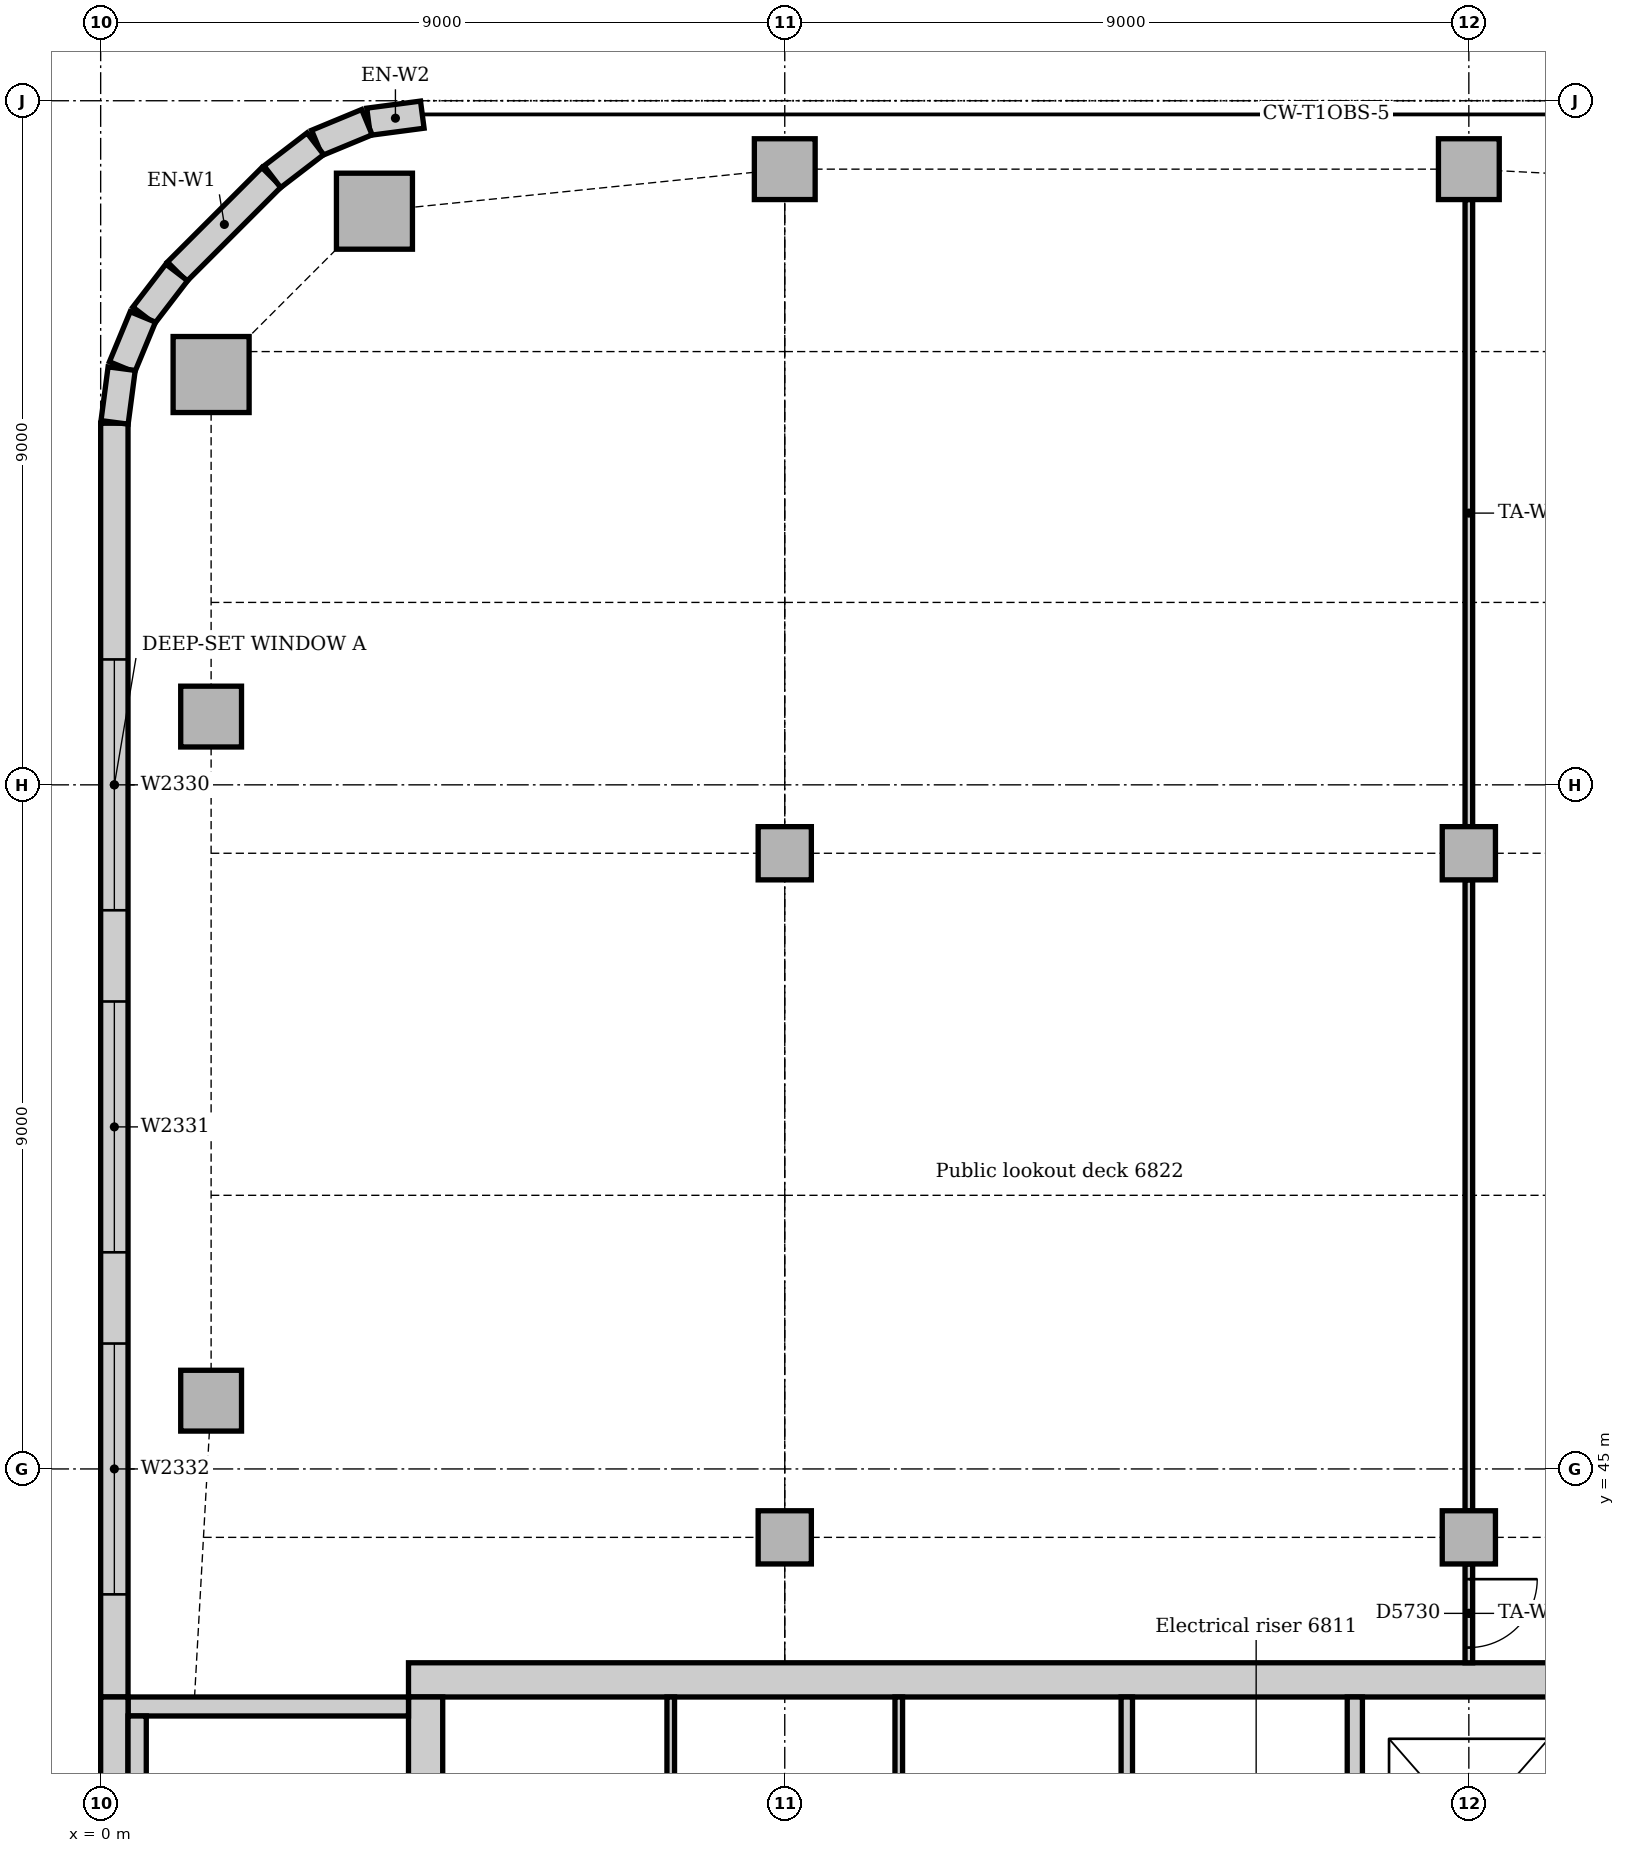
"""IFC4 building model, lengths in metres.
Left out: names, types, materials, properties, quantities, classifications, styles, units other than length and angle.
Written with IfcOpenShell. Run it as: python <this file> out.ifc"""

import sys

from ifc_helpers import new_model, si_unit, direction, frame, frame_2d, origin, origin_2d, place, context, subcontext, project, spatial, rectangle, extrude, element, fill, save


model = new_model("IFC4")
c1 = context("Model", 3, precision=1e-05, world=origin(), true_north=direction((0.0, 1.0)))
c2 = subcontext(c1, "Body", "Model", "MODEL_VIEW")
j1 = project(units=[si_unit("LENGTHUNIT", "METRE"), si_unit("PLANEANGLEUNIT", "RADIAN")], contexts=[c1])
p1 = place(None, origin())
s1 = spatial("IfcSite", under=j1, at=p1, CompositionType="ELEMENT")
p2 = place(p1, origin())
s2 = spatial("IfcBuilding", under=s1, at=p2, CompositionType="ELEMENT")
p3 = place(p2, frame((0.0, 0.0, 283.0)))
s3 = spatial("IfcBuildingStorey", under=s2, at=p3, CompositionType="ELEMENT", Elevation=283.0)
p4 = place(p3, frame((22.95, 42.225, 0.0), z_axis=(0.0, 0.0, 1.0), x_axis=(-1.0, 0.0, 0.0)))
e1 = element("IfcWall", 1, at=p4, inside=s3, PredefinedType="SOLIDWALL", context=c2, shape_type="SweptSolid", body=[
    extrude(rectangle(XDim=18.9, YDim=0.45, at=frame_2d((9.45, 0.0))), origin(), (0.0, 0.0, 1.0), 8.0),
])
p5 = place(p3, frame((4.275, 42.0, 0.0), z_axis=(0.0, 0.0, 1.0), x_axis=(0.0, -1.0, 0.0)))
e2 = element("IfcWall", 2, at=p5, inside=s3, PredefinedType="SOLIDWALL", context=c2, shape_type="SweptSolid", body=[
    extrude(rectangle(XDim=10.5, YDim=0.45, at=frame_2d((5.25, 0.0))), origin(), (0.0, 0.0, 1.0), 8.0),
])
p6 = place(p5, frame((5.3, 0.0, 0.0)))
e3 = element("IfcOpeningElement", 3, at=p6, cuts=e2, PredefinedType="OPENING", context=c2, shape_type="SweptSolid", body=[
    extrude(rectangle(XDim=1.0, YDim=2.1, at=frame_2d((0.5, 1.05))), frame((0.0, 0.235, 0.0), z_axis=(0.0, -1.0, 0.0), x_axis=(1.0, 0.0, 0.0)), (0.0, 0.0, 1.0), 0.47),
])
p7 = place(p3, frame((4.05, 41.875, 0.0), z_axis=(0.0, 0.0, 1.0), x_axis=(-1.0, 0.0, 0.0)))
e4 = element("IfcWall", 4, at=p7, inside=s3, PredefinedType="SOLIDWALL", context=c2, shape_type="SweptSolid", body=[
    extrude(rectangle(XDim=3.69, YDim=0.25, at=frame_2d((1.845, 0.0))), origin(), (0.0, 0.0, 1.0), 8.0),
])
for number, where, z_axis, x_axis in (
    (5, (3.602, 61.547, 0.0), (0.0, 0.0, 1.0), (1.0, 0.0, 0.0)),
    (6, (1.453, 59.398, 0.0), (0.0, 0.0, 1.0), (1.0, 0.0, 0.0)),
):
    element("IfcColumn", number, at=place(p3, frame(where, z_axis=z_axis, x_axis=x_axis)), inside=s3, PredefinedType="COLUMN", context=c2, shape_type="SweptSolid", body=[
        extrude(rectangle(XDim=1.0, YDim=1.0, at=origin_2d()), origin(), (0.0, 0.0, 1.0), 7.7),
    ])
for number, where, z_axis, x_axis in (
    (7, (9.0, 62.1, 0.0), (0.0, 0.0, 1.0), (1.0, 0.0, 0.0)),
    (8, (18.0, 62.1, 0.0), (0.0, 0.0, 1.0), (1.0, 0.0, 0.0)),
    (9, (1.453, 45.898, 0.0), (0.0, 0.0, 1.0), (1.0, 0.0, 0.0)),
    (10, (1.453, 54.898, 0.0), (0.0, 0.0, 1.0), (1.0, 0.0, 0.0)),
):
    element("IfcColumn", number, at=place(p3, frame(where, z_axis=z_axis, x_axis=x_axis)), inside=s3, PredefinedType="COLUMN", context=c2, shape_type="SweptSolid", body=[
        extrude(rectangle(XDim=0.8, YDim=0.8, at=origin_2d()), origin(), (0.0, 0.0, 1.0), 7.7),
    ])
for number, where, z_axis, x_axis in (
    (11, (9.0, 44.1, 0.0), (0.0, 0.0, 1.0), (1.0, 0.0, 0.0)),
    (12, (9.0, 53.1, 0.0), (0.0, 0.0, 1.0), (1.0, 0.0, 0.0)),
    (13, (18.0, 44.1, 0.0), (0.0, 0.0, 1.0), (1.0, 0.0, 0.0)),
    (14, (18.0, 53.1, 0.0), (0.0, 0.0, 1.0), (1.0, 0.0, 0.0)),
):
    element("IfcColumn", number, at=place(p3, frame(where, z_axis=z_axis, x_axis=x_axis)), inside=s3, PredefinedType="COLUMN", context=c2, shape_type="SweptSolid", body=[
        extrude(rectangle(XDim=0.7, YDim=0.7, at=origin_2d()), origin(), (0.0, 0.0, 1.0), 7.7),
    ])
p8 = place(p3, frame((2.249, 61.994, 0.0), z_axis=(0.0, 0.0, 1.0), x_axis=(-0.707106781187, -0.707106781187, 0.0)))
e15 = element("IfcWall", 15, at=p8, inside=s3, PredefinedType="STANDARD", context=c2, shape_type="SweptSolid", body=[
    extrude(rectangle(XDim=1.757, YDim=0.36, at=frame_2d((0.879, 0.0))), origin(), (0.0, 0.0, 1.0), 7.7),
])
p9 = place(p3, frame((0.18, 58.757, 0.0), z_axis=(0.0, 0.0, 1.0), x_axis=(0.0, -1.0, 0.0)))
e16 = element("IfcWall", 16, at=p9, inside=s3, PredefinedType="STANDARD", context=c2, shape_type="SweptSolid", body=[
    extrude(rectangle(XDim=16.757, YDim=0.36, at=frame_2d((8.379, 0.0))), origin(), (0.0, 0.0, 1.0), 7.7),
])
p10 = place(p9, frame((3.107, 0.0, 0.9)))
e17 = element("IfcOpeningElement", 17, at=p10, cuts=e16, PredefinedType="OPENING", context=c2, shape_type="SweptSolid", body=[
    extrude(rectangle(XDim=3.3, YDim=1.6, at=frame_2d((1.65, 0.8))), frame((0.0, 0.19, 0.0), z_axis=(0.0, -1.0, 0.0), x_axis=(1.0, 0.0, 0.0)), (0.0, 0.0, 1.0), 0.38),
])
p11 = place(p9, frame((7.607, 0.0, 0.9)))
e18 = element("IfcOpeningElement", 18, at=p11, cuts=e16, PredefinedType="OPENING", context=c2, shape_type="SweptSolid", body=[
    extrude(rectangle(XDim=3.3, YDim=1.6, at=frame_2d((1.65, 0.8))), frame((0.0, 0.19, 0.0), z_axis=(0.0, -1.0, 0.0), x_axis=(1.0, 0.0, 0.0)), (0.0, 0.0, 1.0), 0.38),
])
p12 = place(p9, frame((12.107, 0.0, 0.9)))
e19 = element("IfcOpeningElement", 19, at=p12, cuts=e16, PredefinedType="OPENING", context=c2, shape_type="SweptSolid", body=[
    extrude(rectangle(XDim=3.3, YDim=1.6, at=frame_2d((1.65, 0.8))), frame((0.0, 0.19, 0.0), z_axis=(0.0, -1.0, 0.0), x_axis=(1.0, 0.0, 0.0)), (0.0, 0.0, 1.0), 0.38),
])
p13 = place(p3, frame((0.18, 42.0, 0.0), z_axis=(0.0, 0.0, 1.0), x_axis=(0.0, -1.0, 0.0)))
e20 = element("IfcWall", 20, at=p13, inside=s3, PredefinedType="STANDARD", context=c2, shape_type="SweptSolid", body=[
    extrude(rectangle(XDim=6.75, YDim=0.36, at=frame_2d((3.375, 0.0))), origin(), (0.0, 0.0, 1.0), 7.7),
])
for number, where, z_axis, x_axis in (
    (21, (4.231, 62.817, 0.0), (0.0, 0.0, 1.0), (-0.991, -0.131, 0.0)),
    (22, (3.503, 62.718, 0.0), (0.0, 0.0, 1.0), (-0.924, -0.383, 0.0)),
):
    element("IfcWall", number, at=place(p3, frame(where, z_axis=z_axis, x_axis=x_axis)), inside=s3, PredefinedType="STANDARD", context=c2, shape_type="SweptSolid", body=[
        extrude(rectangle(XDim=0.713, YDim=0.36, at=frame_2d((0.356, 0.0))), origin(), (0.0, 0.0, 1.0), 7.7),
    ])
for number, where, z_axis, x_axis in (
    (23, (2.825, 62.434, 0.0), (0.0, 0.0, 1.0), (-0.793, -0.609, 0.0)),
    (24, (1.0, 60.741, 0.0), (0.0, 0.0, 1.0), (-0.609, -0.793, 0.0)),
):
    element("IfcWall", number, at=place(p3, frame(where, z_axis=z_axis, x_axis=x_axis)), inside=s3, PredefinedType="STANDARD", context=c2, shape_type="SweptSolid", body=[
        extrude(rectangle(XDim=0.713, YDim=0.36, at=frame_2d((0.357, 0.0))), origin(), (0.0, 0.0, 1.0), 7.7),
    ])
for number, where, z_axis, x_axis in (
    (25, (0.555, 60.156, 0.0), (0.0, 0.0, 1.0), (-0.383, -0.924, 0.0)),
    (26, (0.276, 59.476, 0.0), (0.0, 0.0, 1.0), (-0.131, -0.991, 0.0)),
):
    element("IfcWall", number, at=place(p3, frame(where, z_axis=z_axis, x_axis=x_axis)), inside=s3, PredefinedType="STANDARD", context=c2, shape_type="SweptSolid", body=[
        extrude(rectangle(XDim=0.713, YDim=0.36, at=frame_2d((0.356, 0.0))), origin(), (0.0, 0.0, 1.0), 7.7),
    ])
p14 = place(p3, frame((0.48, 40.13, 0.0), z_axis=(0.0, 0.0, 1.0), x_axis=(0.0, 1.0, 0.0)))
e27 = element("IfcWall", 27, at=p14, inside=s3, PredefinedType="STANDARD", context=c2, shape_type="SweptSolid", body=[
    extrude(rectangle(XDim=1.62, YDim=0.24, at=frame_2d((0.81, 0.0))), origin(), (0.0, 0.0, 1.0), 8.0),
])
p15 = place(p3, frame((16.5, 38.6, 0.0), z_axis=(0.0, 0.0, 1.0), x_axis=(0.0, 1.0, 0.0)))
e28 = element("IfcWall", 28, at=p15, inside=s3, PredefinedType="PARTITIONING", context=c2, shape_type="SweptSolid", body=[
    extrude(rectangle(XDim=3.4, YDim=0.2, at=frame_2d((1.7, 0.0))), origin(), (0.0, 0.0, 1.0), 7.7),
])
p16 = place(p3, frame((13.5, 38.575, 0.0), z_axis=(0.0, 0.0, 1.0), x_axis=(0.0, 1.0, 0.0)))
e29 = element("IfcWall", 29, at=p16, inside=s3, PredefinedType="PARTITIONING", context=c2, shape_type="SweptSolid", body=[
    extrude(rectangle(XDim=3.425, YDim=0.15, at=frame_2d((1.712, 0.0))), origin(), (0.0, 0.0, 1.0), 7.7),
])
p17 = place(p3, frame((18.0, 42.45, 0.0), z_axis=(0.0, 0.0, 1.0), x_axis=(0.0, 1.0, 0.0)))
e30 = element("IfcWall", 30, at=p17, inside=s3, PredefinedType="PARTITIONING", context=c2, shape_type="SweptSolid", body=[
    extrude(rectangle(XDim=1.3, YDim=0.1, at=frame_2d((0.65, 0.0))), origin(), (0.0, 0.0, 1.0), 7.502),
])
p18 = place(p17, frame((0.2, 0.0, 0.0)))
e31 = element("IfcOpeningElement", 31, at=p18, cuts=e30, PredefinedType="OPENING", context=c2, shape_type="SweptSolid", body=[
    extrude(rectangle(XDim=0.9, YDim=2.1, at=frame_2d((0.45, 1.05))), frame((0.0, 0.06, 0.0), z_axis=(0.0, -1.0, 0.0), x_axis=(1.0, 0.0, 0.0)), (0.0, 0.0, 1.0), 0.12),
])
p19 = place(p3, frame((18.0, 44.45, 0.0), z_axis=(0.0, 0.0, 1.0), x_axis=(0.0, 1.0, 0.0)))
e32 = element("IfcWall", 32, at=p19, inside=s3, PredefinedType="PARTITIONING", context=c2, shape_type="SweptSolid", body=[
    extrude(rectangle(XDim=8.3, YDim=0.1, at=frame_2d((4.15, 0.0))), origin(), (0.0, 0.0, 1.0), 7.25),
])
p20 = place(p3, frame((18.0, 53.45, 0.0), z_axis=(0.0, 0.0, 1.0), x_axis=(0.0, 1.0, 0.0)))
e33 = element("IfcWall", 33, at=p20, inside=s3, PredefinedType="PARTITIONING", context=c2, shape_type="SweptSolid", body=[
    extrude(rectangle(XDim=8.25, YDim=0.1, at=frame_2d((4.125, 0.0))), origin(), (0.0, 0.0, 1.0), 7.25),
])
for number, where, z_axis, x_axis in (
    (34, (7.5, 38.575, 0.0), (0.0, 0.0, 1.0), (0.0, 1.0, 0.0)),
    (35, (10.5, 38.575, 0.0), (0.0, 0.0, 1.0), (0.0, 1.0, 0.0)),
):
    element("IfcWall", number, at=place(p3, frame(where, z_axis=z_axis, x_axis=x_axis)), inside=s3, PredefinedType="PARTITIONING", context=c2, shape_type="SweptSolid", body=[
        extrude(rectangle(XDim=3.425, YDim=0.1, at=frame_2d((1.712, 0.0))), origin(), (0.0, 0.0, 1.0), 7.7),
    ])
p21 = place(p10, origin())
e36 = element("IfcWindow", 36, at=p21, inside=s3, PartitioningType="SINGLE_PANEL", PredefinedType="WINDOW", context=c2, shape_type="SweptSolid", body=[
    extrude(rectangle(XDim=3.3, YDim=1.6, at=frame_2d((1.65, 0.8))), frame((0.0, 0.13, 0.0), z_axis=(0.0, -1.0, 0.0), x_axis=(1.0, 0.0, 0.0)), (0.0, 0.0, 1.0), 0.06),
])
fill(e17, e36)
p22 = place(p11, origin())
e37 = element("IfcWindow", 37, at=p22, inside=s3, PartitioningType="SINGLE_PANEL", PredefinedType="WINDOW", context=c2, shape_type="SweptSolid", body=[
    extrude(rectangle(XDim=3.3, YDim=1.6, at=frame_2d((1.65, 0.8))), frame((0.0, 0.13, 0.0), z_axis=(0.0, -1.0, 0.0), x_axis=(1.0, 0.0, 0.0)), (0.0, 0.0, 1.0), 0.06),
])
fill(e18, e37)
p23 = place(p12, origin())
e38 = element("IfcWindow", 38, at=p23, inside=s3, PartitioningType="SINGLE_PANEL", PredefinedType="WINDOW", context=c2, shape_type="SweptSolid", body=[
    extrude(rectangle(XDim=3.3, YDim=1.6, at=frame_2d((1.65, 0.8))), frame((0.0, 0.13, 0.0), z_axis=(0.0, -1.0, 0.0), x_axis=(1.0, 0.0, 0.0)), (0.0, 0.0, 1.0), 0.06),
])
fill(e19, e38)
p24 = place(p18, frame((0.9, 0.0, 0.0), z_axis=(0.0, 0.0, 1.0), x_axis=(-1.0, 0.0, 0.0)))
e39 = element("IfcDoor", 39, at=p24, inside=s3, OperationType="SINGLE_SWING_LEFT", PredefinedType="DOOR", context=c2, shape_type="SweptSolid", body=[
    extrude(rectangle(XDim=0.9, YDim=2.1, at=frame_2d((0.45, 1.05))), frame((0.0, 0.025, 0.0), z_axis=(0.0, -1.0, 0.0), x_axis=(1.0, 0.0, 0.0)), (0.0, 0.0, 1.0), 0.05),
])
fill(e31, e39)
save(model, sys.argv[1])
